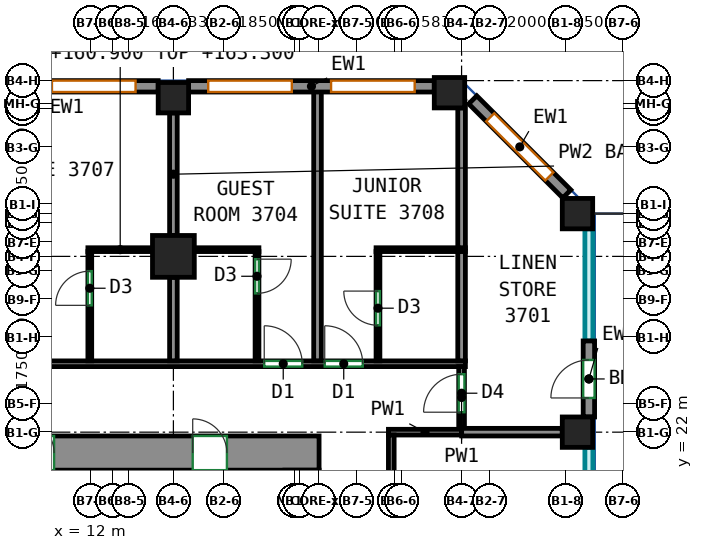
"""IFC4 building model, lengths in metres.
Left out: names, types, materials, properties, quantities, classifications, styles, units other than length and angle.
Written with IfcOpenShell. Run it as: python <this file> out.ifc"""

import sys

from ifc_helpers import new_model, si_unit, direction, frame, frame_2d, origin, origin_2d, place, context, subcontext, project, spatial, rectangle, extrude, source, transform, mapped, element, fill, save


model = new_model("IFC4")
c1 = context("Model", 3, precision=1e-05, world=origin(), true_north=direction((0.0, 1.0)))
c2 = subcontext(c1, "Body", "Model", "MODEL_VIEW")
j1 = project(units=[si_unit("LENGTHUNIT", "METRE"), si_unit("PLANEANGLEUNIT", "RADIAN")], contexts=[c1])
p1 = place(None, origin())
s1 = spatial("IfcSite", under=j1, at=p1, CompositionType="ELEMENT")
p2 = place(p1, origin())
s2 = spatial("IfcBuilding", under=s1, at=p2, CompositionType="ELEMENT")
p3 = place(p2, frame((0.0, 0.0, 160.9)))
s3 = spatial("IfcBuildingStorey", under=s2, at=p3, CompositionType="ELEMENT", Elevation=160.9)
m1 = source(origin(), c2, "Body", "SweptSolid", [
    extrude(rectangle(XDim=1.1, YDim=1.1, at=origin_2d()), origin(), (0.0, 0.0, 1.0), 3.0),
])
p4 = place(p3, frame((14.167, 26.625, 0.0), z_axis=(0.0, 0.0, 1.0), x_axis=(1.0, 0.0, 0.0)))
e1 = element("IfcColumn", 1, at=p4, inside=s3, PredefinedType="COLUMN", context=c2, shape_type="MappedRepresentation", body=[
    mapped(m1, transform((0.0, 0.0, 0.0))),
])
m2 = source(origin(), c2, "Body", "SweptSolid", [
    extrude(rectangle(XDim=0.8, YDim=0.8, at=origin_2d()), origin(), (0.0, 0.0, 1.0), 3.0),
])
for number, where, z_axis, x_axis in (
    (2, (14.167, 30.8, 0.0), (0.0, 0.0, 1.0), (1.0, 0.0, 0.0)),
    (3, (21.432, 30.932, 0.0), (0.0, 0.0, 1.0), (1.0, 0.0, 0.0)),
    (4, (24.8, 22.0, 0.0), (0.0, 0.0, 1.0), (1.0, 0.0, 0.0)),
    (5, (24.8, 27.75, 0.0), (0.0, 0.0, 1.0), (1.0, 0.0, 0.0)),
):
    element("IfcColumn", number, at=place(p3, frame(where, z_axis=z_axis, x_axis=x_axis)), inside=s3, PredefinedType="COLUMN", context=c2, shape_type="MappedRepresentation", body=[
        mapped(m2, transform((0.0, 0.0, 0.0))),
    ])
m3 = source(origin(), c2, "Body", "SweptSolid", [
    extrude(rectangle(XDim=33.9, YDim=0.9, at=frame_2d((16.95, 0.0))), origin(), (0.0, 0.0, 1.0), 3.0),
])
p5 = place(p3, frame((-15.9, 21.45, 0.0), z_axis=(0.0, 0.0, 1.0), x_axis=(1.0, 0.0, 0.0)))
e6 = element("IfcWall", 6, at=p5, inside=s3, PredefinedType="SHEAR", context=c2, shape_type="MappedRepresentation", body=[
    mapped(m3, transform((0.0, 0.0, 0.0))),
])
p6 = place(p5, frame((6.731, 0.0, 0.0)))
e7 = element("IfcOpeningElement", 7, at=p6, cuts=e6, PredefinedType="OPENING", context=c2, shape_type="SweptSolid", body=[
    extrude(rectangle(XDim=0.9, YDim=2.1, at=frame_2d((0.45, 1.05))), frame((0.0, 0.46, 0.0), z_axis=(0.0, -1.0, 0.0), x_axis=(1.0, 0.0, 0.0)), (0.0, 0.0, 1.0), 0.92),
])
p7 = place(p5, frame((12.038, 0.0, 0.0)))
e8 = element("IfcOpeningElement", 8, at=p7, cuts=e6, PredefinedType="OPENING", context=c2, shape_type="SweptSolid", body=[
    extrude(rectangle(XDim=0.9, YDim=2.1, at=frame_2d((0.45, 1.05))), frame((0.0, 0.46, 0.0), z_axis=(0.0, -1.0, 0.0), x_axis=(1.0, 0.0, 0.0)), (0.0, 0.0, 1.0), 0.92),
])
p8 = place(p5, frame((16.446, 0.0, 0.0)))
e9 = element("IfcOpeningElement", 9, at=p8, cuts=e6, PredefinedType="OPENING", context=c2, shape_type="SweptSolid", body=[
    extrude(rectangle(XDim=0.9, YDim=2.1, at=frame_2d((0.45, 1.05))), frame((0.0, 0.46, 0.0), z_axis=(0.0, -1.0, 0.0), x_axis=(1.0, 0.0, 0.0)), (0.0, 0.0, 1.0), 0.92),
])
p9 = place(p5, frame((18.858, 0.0, 0.0)))
e10 = element("IfcOpeningElement", 10, at=p9, cuts=e6, PredefinedType="OPENING", context=c2, shape_type="SweptSolid", body=[
    extrude(rectangle(XDim=0.9, YDim=2.1, at=frame_2d((0.45, 1.05))), frame((0.0, 0.46, 0.0), z_axis=(0.0, -1.0, 0.0), x_axis=(1.0, 0.0, 0.0)), (0.0, 0.0, 1.0), 0.92),
])
p10 = place(p5, frame((21.686, 0.0, 0.0)))
e11 = element("IfcOpeningElement", 11, at=p10, cuts=e6, PredefinedType="OPENING", context=c2, shape_type="SweptSolid", body=[
    extrude(rectangle(XDim=0.9, YDim=2.1, at=frame_2d((0.45, 1.05))), frame((0.0, 0.46, 0.0), z_axis=(0.0, -1.0, 0.0), x_axis=(1.0, 0.0, 0.0)), (0.0, 0.0, 1.0), 0.92),
])
p11 = place(p5, frame((26.027, 0.0, 0.0)))
e12 = element("IfcOpeningElement", 12, at=p11, cuts=e6, PredefinedType="OPENING", context=c2, shape_type="SweptSolid", body=[
    extrude(rectangle(XDim=0.9, YDim=2.1, at=frame_2d((0.45, 1.05))), frame((0.0, 0.46, 0.0), z_axis=(0.0, -1.0, 0.0), x_axis=(1.0, 0.0, 0.0)), (0.0, 0.0, 1.0), 0.92),
])
p12 = place(p5, frame((2.425, 0.0, 0.0)))
e13 = element("IfcOpeningElement", 13, at=p12, cuts=e6, PredefinedType="OPENING", context=c2, shape_type="SweptSolid", body=[
    extrude(rectangle(XDim=0.9, YDim=2.1, at=frame_2d((0.45, 1.05))), frame((0.0, 0.46, 0.0), z_axis=(0.0, -1.0, 0.0), x_axis=(1.0, 0.0, 0.0)), (0.0, 0.0, 1.0), 0.92),
])
p13 = place(p5, frame((30.575, 0.0, 0.0)))
e14 = element("IfcOpeningElement", 14, at=p13, cuts=e6, PredefinedType="OPENING", context=c2, shape_type="SweptSolid", body=[
    extrude(rectangle(XDim=0.9, YDim=2.1, at=frame_2d((0.45, 1.05))), frame((0.0, 0.46, 0.0), z_axis=(0.0, -1.0, 0.0), x_axis=(1.0, 0.0, 0.0)), (0.0, 0.0, 1.0), 0.92),
])
m4 = source(origin(), c2, "Body", "SweptSolid", [
    extrude(rectangle(XDim=2.0, YDim=0.3, at=frame_2d((1.0, 0.0))), origin(), (0.0, 0.0, 1.0), 3.0),
])
p14 = place(p3, frame((25.1, 22.4, 0.0), z_axis=(0.0, 0.0, 1.0), x_axis=(0.0, 1.0, 0.0)))
e15 = element("IfcWall", 15, at=p14, inside=s3, PredefinedType="SOLIDWALL", context=c2, shape_type="MappedRepresentation", body=[
    mapped(m4, transform((0.0, 0.0, 0.0))),
])
p15 = place(p14, frame((0.5, 0.0, 0.0)))
e16 = element("IfcOpeningElement", 16, at=p15, cuts=e15, PredefinedType="OPENING", context=c2, shape_type="SweptSolid", body=[
    extrude(rectangle(XDim=1.0, YDim=2.1, at=frame_2d((0.5, 1.05))), frame((0.0, 0.16, 0.0), z_axis=(0.0, -1.0, 0.0), x_axis=(1.0, 0.0, 0.0)), (0.0, 0.0, 1.0), 0.32),
])
m5 = source(origin(), c2, "Body", "SweptSolid", [
    extrude(rectangle(XDim=3.5, YDim=0.3, at=frame_2d((1.75, 0.0))), origin(), (0.0, 0.0, 1.0), 3.0),
])
p16 = place(p3, frame((24.519, 28.269, 0.0), z_axis=(0.0, 0.0, 1.0), x_axis=(-0.70707190453, 0.707141656123, 0.0)))
e17 = element("IfcWall", 17, at=p16, inside=s3, PredefinedType="SOLIDWALL", context=c2, shape_type="MappedRepresentation", body=[
    mapped(m5, transform((0.0, 0.0, 0.0))),
])
p17 = place(p16, frame((0.65, 0.0, 0.85)))
e18 = element("IfcOpeningElement", 18, at=p17, cuts=e17, PredefinedType="OPENING", context=c2, shape_type="SweptSolid", body=[
    extrude(rectangle(XDim=2.2, YDim=1.95, at=frame_2d((1.1, 0.975))), frame((0.0, 0.16, 0.0), z_axis=(0.0, -1.0, 0.0), x_axis=(1.0, 0.0, 0.0)), (0.0, 0.0, 1.0), 0.32),
])
m6 = source(origin(), c2, "Body", "SweptSolid", [
    extrude(rectangle(XDim=6.465, YDim=0.3, at=frame_2d((3.232, 0.0))), origin(), (0.0, 0.0, 1.0), 3.0),
])
p18 = place(p3, frame((21.032, 31.1, 0.0), z_axis=(0.0, 0.0, 1.0), x_axis=(-1.0, 0.0, 0.0)))
e19 = element("IfcWall", 19, at=p18, inside=s3, PredefinedType="SOLIDWALL", context=c2, shape_type="MappedRepresentation", body=[
    mapped(m6, transform((0.0, 0.0, 0.0))),
])
p19 = place(p18, frame((0.516, 0.0, 0.85)))
e20 = element("IfcOpeningElement", 20, at=p19, cuts=e19, PredefinedType="OPENING", context=c2, shape_type="SweptSolid", body=[
    extrude(rectangle(XDim=2.2, YDim=1.95, at=frame_2d((1.1, 0.975))), frame((0.0, 0.16, 0.0), z_axis=(0.0, -1.0, 0.0), x_axis=(1.0, 0.0, 0.0)), (0.0, 0.0, 1.0), 0.32),
])
p20 = place(p18, frame((3.749, 0.0, 0.85)))
e21 = element("IfcOpeningElement", 21, at=p20, cuts=e19, PredefinedType="OPENING", context=c2, shape_type="SweptSolid", body=[
    extrude(rectangle(XDim=2.2, YDim=1.95, at=frame_2d((1.1, 0.975))), frame((0.0, 0.16, 0.0), z_axis=(0.0, -1.0, 0.0), x_axis=(1.0, 0.0, 0.0)), (0.0, 0.0, 1.0), 0.32),
])
m7 = source(origin(), c2, "Body", "SweptSolid", [
    extrude(rectangle(XDim=6.783, YDim=0.3, at=frame_2d((3.392, 0.0))), origin(), (0.0, 0.0, 1.0), 3.0),
])
p21 = place(p3, frame((13.767, 31.1, 0.0), z_axis=(0.0, 0.0, 1.0), x_axis=(-1.0, 0.0, 0.0)))
e22 = element("IfcWall", 22, at=p21, inside=s3, PredefinedType="SOLIDWALL", context=c2, shape_type="MappedRepresentation", body=[
    mapped(m7, transform((0.0, 0.0, 0.0))),
])
p22 = place(p21, frame((0.596, 0.0, 0.85)))
e23 = element("IfcOpeningElement", 23, at=p22, cuts=e22, PredefinedType="OPENING", context=c2, shape_type="SweptSolid", body=[
    extrude(rectangle(XDim=2.2, YDim=1.95, at=frame_2d((1.1, 0.975))), frame((0.0, 0.16, 0.0), z_axis=(0.0, -1.0, 0.0), x_axis=(1.0, 0.0, 0.0)), (0.0, 0.0, 1.0), 0.32),
])
p23 = place(p21, frame((3.988, 0.0, 0.85)))
e24 = element("IfcOpeningElement", 24, at=p23, cuts=e22, PredefinedType="OPENING", context=c2, shape_type="SweptSolid", body=[
    extrude(rectangle(XDim=2.2, YDim=1.95, at=frame_2d((1.1, 0.975))), frame((0.0, 0.16, 0.0), z_axis=(0.0, -1.0, 0.0), x_axis=(1.0, 0.0, 0.0)), (0.0, 0.0, 1.0), 0.32),
])
p24 = place(p3, frame((-20.059, 23.8, 0.0), z_axis=(0.0, 0.0, 1.0), x_axis=(1.0, 0.0, 0.0)))
e25 = element("IfcWall", 25, at=p24, inside=s3, PredefinedType="PARTITIONING", context=c2, shape_type="SweptSolid", body=[
    extrude(rectangle(XDim=41.909, YDim=0.15, at=frame_2d((20.955, 0.0))), origin(), (0.0, 0.0, 1.0), 3.0),
])
p25 = place(p24, frame((2.59, 0.0, 0.0)))
e26 = element("IfcOpeningElement", 26, at=p25, cuts=e25, PredefinedType="OPENING", context=c2, shape_type="SweptSolid", body=[
    extrude(rectangle(XDim=1.0, YDim=2.1, at=frame_2d((0.5, 1.05))), frame((0.0, 0.085, 0.0), z_axis=(0.0, -1.0, 0.0), x_axis=(1.0, 0.0, 0.0)), (0.0, 0.0, 1.0), 0.17),
])
p26 = place(p24, frame((8.875, 0.0, 0.0)))
e27 = element("IfcOpeningElement", 27, at=p26, cuts=e25, PredefinedType="OPENING", context=c2, shape_type="SweptSolid", body=[
    extrude(rectangle(XDim=1.0, YDim=2.1, at=frame_2d((0.5, 1.05))), frame((0.0, 0.085, 0.0), z_axis=(0.0, -1.0, 0.0), x_axis=(1.0, 0.0, 0.0)), (0.0, 0.0, 1.0), 0.17),
])
p27 = place(p24, frame((19.203, 0.0, 0.0)))
e28 = element("IfcOpeningElement", 28, at=p27, cuts=e25, PredefinedType="OPENING", context=c2, shape_type="SweptSolid", body=[
    extrude(rectangle(XDim=1.0, YDim=2.1, at=frame_2d((0.5, 1.05))), frame((0.0, 0.085, 0.0), z_axis=(0.0, -1.0, 0.0), x_axis=(1.0, 0.0, 0.0)), (0.0, 0.0, 1.0), 0.17),
])
p28 = place(p24, frame((28.634, 0.0, 0.0)))
e29 = element("IfcOpeningElement", 29, at=p28, cuts=e25, PredefinedType="OPENING", context=c2, shape_type="SweptSolid", body=[
    extrude(rectangle(XDim=1.0, YDim=2.1, at=frame_2d((0.5, 1.05))), frame((0.0, 0.085, 0.0), z_axis=(0.0, -1.0, 0.0), x_axis=(1.0, 0.0, 0.0)), (0.0, 0.0, 1.0), 0.17),
])
p29 = place(p24, frame((36.616, 0.0, 0.0)))
e30 = element("IfcOpeningElement", 30, at=p29, cuts=e25, PredefinedType="OPENING", context=c2, shape_type="SweptSolid", body=[
    extrude(rectangle(XDim=1.0, YDim=2.1, at=frame_2d((0.5, 1.05))), frame((0.0, 0.085, 0.0), z_axis=(0.0, -1.0, 0.0), x_axis=(1.0, 0.0, 0.0)), (0.0, 0.0, 1.0), 0.17),
])
p30 = place(p24, frame((38.208, 0.0, 0.0)))
e31 = element("IfcOpeningElement", 31, at=p30, cuts=e25, PredefinedType="OPENING", context=c2, shape_type="SweptSolid", body=[
    extrude(rectangle(XDim=1.0, YDim=2.1, at=frame_2d((0.5, 1.05))), frame((0.0, 0.085, 0.0), z_axis=(0.0, -1.0, 0.0), x_axis=(1.0, 0.0, 0.0)), (0.0, 0.0, 1.0), 0.17),
])
p31 = place(p3, frame((21.75, 22.1, 0.0), z_axis=(0.0, 0.0, 1.0), x_axis=(0.0, 1.0, 0.0)))
e32 = element("IfcWall", 32, at=p31, inside=s3, PredefinedType="PARTITIONING", context=c2, shape_type="SweptSolid", body=[
    extrude(rectangle(XDim=1.625, YDim=0.15, at=frame_2d((0.812, 0.0))), origin(), (0.0, 0.0, 1.0), 3.0),
])
p32 = place(p31, frame((0.425, 0.0, 0.0)))
e33 = element("IfcOpeningElement", 33, at=p32, cuts=e32, PredefinedType="OPENING", context=c2, shape_type="SweptSolid", body=[
    extrude(rectangle(XDim=1.0, YDim=2.1, at=frame_2d((0.5, 1.05))), frame((0.0, 0.085, 0.0), z_axis=(0.0, -1.0, 0.0), x_axis=(1.0, 0.0, 0.0)), (0.0, 0.0, 1.0), 0.17),
])
p33 = place(p3, frame((19.825, 22.0, 0.0), z_axis=(0.0, 0.0, 1.0), x_axis=(1.0, 0.0, 0.0)))
e34 = element("IfcWall", 34, at=p33, inside=s3, PredefinedType="PARTITIONING", context=c2, shape_type="SweptSolid", body=[
    extrude(rectangle(XDim=1.925, YDim=0.15, at=frame_2d((0.962, 0.0))), origin(), (0.0, 0.0, 1.0), 3.0),
])
p34 = place(p3, frame((19.9, 17.75, 0.0), z_axis=(0.0, 0.0, 1.0), x_axis=(0.0, 1.0, 0.0)))
e35 = element("IfcWall", 35, at=p34, inside=s3, PredefinedType="PARTITIONING", context=c2, shape_type="SweptSolid", body=[
    extrude(rectangle(XDim=4.175, YDim=0.15, at=frame_2d((2.087, 0.0))), origin(), (0.0, 0.0, 1.0), 3.0),
])
p35 = place(p34, frame((2.254, 0.0, 0.0)))
e36 = element("IfcOpeningElement", 36, at=p35, cuts=e35, PredefinedType="OPENING", context=c2, shape_type="SweptSolid", body=[
    extrude(rectangle(XDim=0.9, YDim=2.1, at=frame_2d((0.45, 1.05))), frame((0.0, 0.085, 0.0), z_axis=(0.0, -1.0, 0.0), x_axis=(1.0, 0.0, 0.0)), (0.0, 0.0, 1.0), 0.17),
])
p36 = place(p3, frame((11.917, 26.802, 0.0), z_axis=(0.0, 0.0, 1.0), x_axis=(1.0, 0.0, 0.0)))
e37 = element("IfcWall", 37, at=p36, inside=s3, PredefinedType="PARTITIONING", context=c2, shape_type="SweptSolid", body=[
    extrude(rectangle(XDim=1.7, YDim=0.1, at=frame_2d((0.85, 0.0))), origin(), (0.0, 0.0, 1.0), 2.4),
])
p37 = place(p3, frame((11.967, 23.877, 0.0), z_axis=(0.0, 0.0, 1.0), x_axis=(0.0, 1.0, 0.0)))
e38 = element("IfcWall", 38, at=p37, inside=s3, PredefinedType="PARTITIONING", context=c2, shape_type="SweptSolid", body=[
    extrude(rectangle(XDim=2.875, YDim=0.1, at=frame_2d((1.438, 0.0))), origin(), (0.0, 0.0, 1.0), 3.0),
])
p38 = place(p37, frame((1.46, 0.0, 0.0)))
e39 = element("IfcOpeningElement", 39, at=p38, cuts=e38, PredefinedType="OPENING", context=c2, shape_type="SweptSolid", body=[
    extrude(rectangle(XDim=0.9, YDim=2.1, at=frame_2d((0.45, 1.05))), frame((0.0, 0.06, 0.0), z_axis=(0.0, -1.0, 0.0), x_axis=(1.0, 0.0, 0.0)), (0.0, 0.0, 1.0), 0.12),
])
p39 = place(p3, frame((14.167, 27.175, 0.0), z_axis=(0.0, 0.0, 1.0), x_axis=(0.0, 1.0, 0.0)))
e40 = element("IfcWall", 40, at=p39, inside=s3, PredefinedType="PARTITIONING", context=c2, shape_type="SweptSolid", body=[
    extrude(rectangle(XDim=3.225, YDim=0.2, at=frame_2d((1.612, 0.0))), origin(), (0.0, 0.0, 1.0), 2.4),
])
p40 = place(p3, frame((14.167, 23.877, 0.0), z_axis=(0.0, 0.0, 1.0), x_axis=(0.0, 1.0, 0.0)))
e41 = element("IfcWall", 41, at=p40, inside=s3, PredefinedType="PARTITIONING", context=c2, shape_type="SweptSolid", body=[
    extrude(rectangle(XDim=2.198, YDim=0.2, at=frame_2d((1.099, 0.0))), origin(), (0.0, 0.0, 1.0), 3.0),
])
p41 = place(p3, frame((14.717, 26.802, 0.0), z_axis=(0.0, 0.0, 1.0), x_axis=(1.0, 0.0, 0.0)))
e42 = element("IfcWall", 42, at=p41, inside=s3, PredefinedType="PARTITIONING", context=c2, shape_type="SweptSolid", body=[
    extrude(rectangle(XDim=1.7, YDim=0.1, at=frame_2d((0.85, 0.0))), origin(), (0.0, 0.0, 1.0), 3.0),
])
p42 = place(p3, frame((16.367, 26.752, 0.0), z_axis=(0.0, 0.0, 1.0), x_axis=(0.0, -1.0, 0.0)))
e43 = element("IfcWall", 43, at=p42, inside=s3, PredefinedType="PARTITIONING", context=c2, shape_type="SweptSolid", body=[
    extrude(rectangle(XDim=2.875, YDim=0.1, at=frame_2d((1.438, 0.0))), origin(), (0.0, 0.0, 1.0), 3.0),
])
p43 = place(p42, frame((0.2, 0.0, 0.0)))
e44 = element("IfcOpeningElement", 44, at=p43, cuts=e43, PredefinedType="OPENING", context=c2, shape_type="SweptSolid", body=[
    extrude(rectangle(XDim=0.9, YDim=2.1, at=frame_2d((0.45, 1.05))), frame((0.0, 0.06, 0.0), z_axis=(0.0, -1.0, 0.0), x_axis=(1.0, 0.0, 0.0)), (0.0, 0.0, 1.0), 0.12),
])
p44 = place(p3, frame((17.959, 23.877, 0.0), z_axis=(0.0, 0.0, 1.0), x_axis=(0.0, 1.0, 0.0)))
e45 = element("IfcWall", 45, at=p44, inside=s3, PredefinedType="PARTITIONING", context=c2, shape_type="SweptSolid", body=[
    extrude(rectangle(XDim=7.123, YDim=0.2, at=frame_2d((3.562, 0.0))), origin(), (0.0, 0.0, 1.0), 3.0),
])
p45 = place(p3, frame((19.5, 26.802, 0.0), z_axis=(0.0, 0.0, 1.0), x_axis=(1.0, 0.0, 0.0)))
e46 = element("IfcWall", 46, at=p45, inside=s3, PredefinedType="PARTITIONING", context=c2, shape_type="SweptSolid", body=[
    extrude(rectangle(XDim=2.35, YDim=0.1, at=frame_2d((1.175, 0.0))), origin(), (0.0, 0.0, 1.0), 3.0),
])
p46 = place(p3, frame((19.55, 23.877, 0.0), z_axis=(0.0, 0.0, 1.0), x_axis=(0.0, 1.0, 0.0)))
e47 = element("IfcWall", 47, at=p46, inside=s3, PredefinedType="PARTITIONING", context=c2, shape_type="SweptSolid", body=[
    extrude(rectangle(XDim=2.875, YDim=0.1, at=frame_2d((1.438, 0.0))), origin(), (0.0, 0.0, 1.0), 3.0),
])
p47 = place(p46, frame((0.935, 0.0, 0.0)))
e48 = element("IfcOpeningElement", 48, at=p47, cuts=e47, PredefinedType="OPENING", context=c2, shape_type="SweptSolid", body=[
    extrude(rectangle(XDim=0.9, YDim=2.1, at=frame_2d((0.45, 1.05))), frame((0.0, 0.06, 0.0), z_axis=(0.0, -1.0, 0.0), x_axis=(1.0, 0.0, 0.0)), (0.0, 0.0, 1.0), 0.12),
])
p48 = place(p3, frame((21.75, 26.852, 0.0), z_axis=(0.0, 0.0, 1.0), x_axis=(0.0, 1.0, 0.0)))
e49 = element("IfcWall", 49, at=p48, inside=s3, PredefinedType="PARTITIONING", context=c2, shape_type="SweptSolid", body=[
    extrude(rectangle(XDim=3.68, YDim=0.2, at=frame_2d((1.84, 0.0))), origin(), (0.0, 0.0, 1.0), 3.0),
])
p49 = place(p3, frame((21.75, 23.877, 0.0), z_axis=(0.0, 0.0, 1.0), x_axis=(0.0, 1.0, 0.0)))
e50 = element("IfcWall", 50, at=p49, inside=s3, PredefinedType="PARTITIONING", context=c2, shape_type="SweptSolid", body=[
    extrude(rectangle(XDim=2.875, YDim=0.2, at=frame_2d((1.438, 0.0))), origin(), (0.0, 0.0, 1.0), 3.0),
])
p50 = place(p3, frame((21.752, 22.0, 0.0), z_axis=(0.0, 0.0, 1.0), x_axis=(1.0, 0.0, 0.0)))
e51 = element("IfcWall", 51, at=p50, inside=s3, PredefinedType="PARTITIONING", context=c2, shape_type="SweptSolid", body=[
    extrude(rectangle(XDim=2.648, YDim=0.2, at=frame_2d((1.324, 0.0))), origin(), (0.0, 0.0, 1.0), 3.0),
])
p51 = place(p15, origin())
e52 = element("IfcDoor", 52, at=p51, inside=s3, OperationType="SINGLE_SWING_LEFT", PredefinedType="DOOR", context=c2, shape_type="SweptSolid", body=[
    extrude(rectangle(XDim=1.0, YDim=2.1, at=frame_2d((0.5, 1.05))), frame((0.0, 0.025, 0.0), z_axis=(0.0, -1.0, 0.0), x_axis=(1.0, 0.0, 0.0)), (0.0, 0.0, 1.0), 0.05),
])
fill(e16, e52)
p52 = place(p17, origin())
e53 = element("IfcWindow", 53, at=p52, inside=s3, PartitioningType="SINGLE_PANEL", PredefinedType="WINDOW", context=c2, shape_type="SweptSolid", body=[
    extrude(rectangle(XDim=2.2, YDim=1.95, at=frame_2d((1.1, 0.975))), frame((0.0, 0.03, 0.0), z_axis=(0.0, -1.0, 0.0), x_axis=(1.0, 0.0, 0.0)), (0.0, 0.0, 1.0), 0.06),
])
fill(e18, e53)
p53 = place(p19, origin())
e54 = element("IfcWindow", 54, at=p53, inside=s3, PartitioningType="SINGLE_PANEL", PredefinedType="WINDOW", context=c2, shape_type="SweptSolid", body=[
    extrude(rectangle(XDim=2.2, YDim=1.95, at=frame_2d((1.1, 0.975))), frame((0.0, 0.03, 0.0), z_axis=(0.0, -1.0, 0.0), x_axis=(1.0, 0.0, 0.0)), (0.0, 0.0, 1.0), 0.06),
])
fill(e20, e54)
p54 = place(p20, origin())
e55 = element("IfcWindow", 55, at=p54, inside=s3, PartitioningType="SINGLE_PANEL", PredefinedType="WINDOW", context=c2, shape_type="SweptSolid", body=[
    extrude(rectangle(XDim=2.2, YDim=1.95, at=frame_2d((1.1, 0.975))), frame((0.0, 0.03, 0.0), z_axis=(0.0, -1.0, 0.0), x_axis=(1.0, 0.0, 0.0)), (0.0, 0.0, 1.0), 0.06),
])
fill(e21, e55)
p55 = place(p22, origin())
e56 = element("IfcWindow", 56, at=p55, inside=s3, PartitioningType="SINGLE_PANEL", PredefinedType="WINDOW", context=c2, shape_type="SweptSolid", body=[
    extrude(rectangle(XDim=2.2, YDim=1.95, at=frame_2d((1.1, 0.975))), frame((0.0, 0.03, 0.0), z_axis=(0.0, -1.0, 0.0), x_axis=(1.0, 0.0, 0.0)), (0.0, 0.0, 1.0), 0.06),
])
fill(e23, e56)
p56 = place(p11, origin())
e57 = element("IfcDoor", 57, at=p56, inside=s3, OperationType="SINGLE_SWING_LEFT", PredefinedType="DOOR", context=c2, shape_type="SweptSolid", body=[
    extrude(rectangle(XDim=0.9, YDim=2.1, at=frame_2d((0.45, 1.05))), frame((0.0, -0.305, 0.0), z_axis=(0.0, -1.0, 0.0), x_axis=(1.0, 0.0, 0.0)), (0.0, 0.0, 1.0), 0.05),
])
fill(e12, e57)
p57 = place(p13, origin())
e58 = element("IfcDoor", 58, at=p57, inside=s3, OperationType="SINGLE_SWING_LEFT", PredefinedType="DOOR", context=c2, shape_type="SweptSolid", body=[
    extrude(rectangle(XDim=0.9, YDim=2.1, at=frame_2d((0.45, 1.05))), frame((0.0, -0.305, 0.0), z_axis=(0.0, -1.0, 0.0), x_axis=(1.0, 0.0, 0.0)), (0.0, 0.0, 1.0), 0.05),
])
fill(e14, e58)
p58 = place(p32, origin())
e59 = element("IfcDoor", 59, at=p58, inside=s3, OperationType="SINGLE_SWING_LEFT", PredefinedType="DOOR", context=c2, shape_type="SweptSolid", body=[
    extrude(rectangle(XDim=1.0, YDim=2.1, at=frame_2d((0.5, 1.05))), frame((0.0, 0.025, 0.0), z_axis=(0.0, -1.0, 0.0), x_axis=(1.0, 0.0, 0.0)), (0.0, 0.0, 1.0), 0.05),
])
fill(e33, e59)
p59 = place(p29, origin())
e60 = element("IfcDoor", 60, at=p59, inside=s3, OperationType="SINGLE_SWING_LEFT", PredefinedType="DOOR", context=c2, shape_type="SweptSolid", body=[
    extrude(rectangle(XDim=1.0, YDim=2.1, at=frame_2d((0.5, 1.05))), frame((0.0, 0.025, 0.0), z_axis=(0.0, -1.0, 0.0), x_axis=(1.0, 0.0, 0.0)), (0.0, 0.0, 1.0), 0.05),
])
fill(e30, e60)
p60 = place(p30, origin())
e61 = element("IfcDoor", 61, at=p60, inside=s3, OperationType="SINGLE_SWING_LEFT", PredefinedType="DOOR", context=c2, shape_type="SweptSolid", body=[
    extrude(rectangle(XDim=1.0, YDim=2.1, at=frame_2d((0.5, 1.05))), frame((0.0, 0.025, 0.0), z_axis=(0.0, -1.0, 0.0), x_axis=(1.0, 0.0, 0.0)), (0.0, 0.0, 1.0), 0.05),
])
fill(e31, e61)
p61 = place(p47, origin())
e62 = element("IfcDoor", 62, at=p61, inside=s3, OperationType="SINGLE_SWING_RIGHT", PredefinedType="DOOR", context=c2, shape_type="SweptSolid", body=[
    extrude(rectangle(XDim=0.9, YDim=2.1, at=frame_2d((0.45, 1.05))), frame((0.0, 0.025, 0.0), z_axis=(0.0, -1.0, 0.0), x_axis=(1.0, 0.0, 0.0)), (0.0, 0.0, 1.0), 0.05),
])
fill(e48, e62)
p62 = place(p38, origin())
e63 = element("IfcDoor", 63, at=p62, inside=s3, OperationType="SINGLE_SWING_LEFT", PredefinedType="DOOR", context=c2, shape_type="SweptSolid", body=[
    extrude(rectangle(XDim=0.9, YDim=2.1, at=frame_2d((0.45, 1.05))), frame((0.0, 0.025, 0.0), z_axis=(0.0, -1.0, 0.0), x_axis=(1.0, 0.0, 0.0)), (0.0, 0.0, 1.0), 0.05),
])
fill(e39, e63)
p63 = place(p43, origin())
e64 = element("IfcDoor", 64, at=p63, inside=s3, OperationType="SINGLE_SWING_LEFT", PredefinedType="DOOR", context=c2, shape_type="SweptSolid", body=[
    extrude(rectangle(XDim=0.9, YDim=2.1, at=frame_2d((0.45, 1.05))), frame((0.0, 0.025, 0.0), z_axis=(0.0, -1.0, 0.0), x_axis=(1.0, 0.0, 0.0)), (0.0, 0.0, 1.0), 0.05),
])
fill(e44, e64)
save(model, sys.argv[1])
